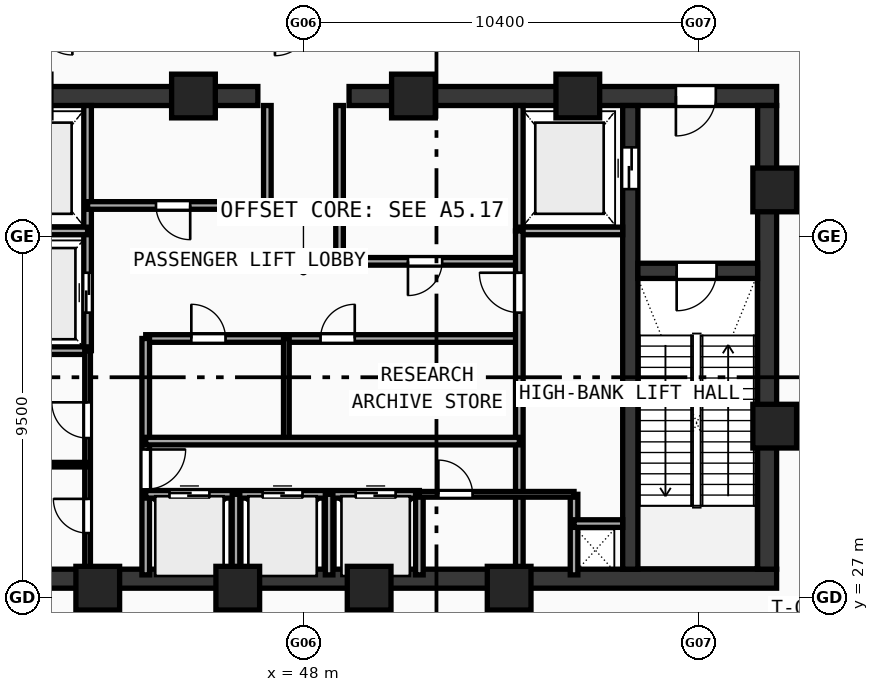
"""IFC4 building model, lengths in metres.
Left out: names, types, materials, properties, quantities, classifications, styles, units other than length and angle.
Written with IfcOpenShell. Run it as: python <this file> out.ifc"""

import sys

from ifc_helpers import new_model, si_unit, direction, frame, frame_2d, origin, origin_with_axes, origin_2d, place, context, subcontext, project, spatial, rectangle, hollow_rectangle, extrude, source, transform, mapped, element, fill, save


model = new_model("IFC4")
c1 = context("Model", 3, precision=1e-05, world=origin(), true_north=direction((0.0, 1.0)))
c2 = subcontext(c1, "Body", "Model", "MODEL_VIEW")
j1 = project(units=[si_unit("LENGTHUNIT", "METRE"), si_unit("PLANEANGLEUNIT", "RADIAN")], contexts=[c1])
p1 = place(None, origin())
s1 = spatial("IfcSite", under=j1, at=p1, CompositionType="ELEMENT")
p2 = place(p1, origin())
s2 = spatial("IfcBuilding", under=s1, at=p2, CompositionType="ELEMENT")
p3 = place(p2, frame((0.0, 0.0, 266.91)))
s3 = spatial("IfcBuildingStorey", under=s2, at=p3, CompositionType="ELEMENT", Elevation=266.91)
p4 = place(p3, frame((35.55, 27.5, 0.0), z_axis=(0.0, 0.0, 1.0), x_axis=(1.0, 0.0, 0.0)))
e1 = element("IfcWall", 1, at=p4, inside=s3, PredefinedType="SHEAR", context=c2, shape_type="SweptSolid", body=[
    extrude(rectangle(XDim=24.9, YDim=0.5, at=frame_2d((12.45, 0.0))), origin(), (0.0, 0.0, 1.0), 5.57),
])
p5 = place(p3, frame((35.55, 40.2, 0.0), z_axis=(0.0, 0.0, 1.0), x_axis=(1.0, 0.0, 0.0)))
e2 = element("IfcWall", 2, at=p5, inside=s3, PredefinedType="SHEAR", context=c2, shape_type="SweptSolid", body=[
    extrude(rectangle(XDim=11.25, YDim=0.5, at=frame_2d((5.625, 0.0))), origin(), (0.0, 0.0, 1.0), 5.57),
])
p6 = place(p5, frame((1.6, 0.0, 0.0)))
e3 = element("IfcOpeningElement", 3, at=p6, cuts=e2, PredefinedType="OPENING", context=c2, shape_type="SweptSolid", body=[
    extrude(rectangle(XDim=1.05, YDim=2.1, at=frame_2d((0.525, 1.05))), frame((0.0, 0.26, 0.0), z_axis=(0.0, -1.0, 0.0), x_axis=(1.0, 0.0, 0.0)), (0.0, 0.0, 1.0), 0.52),
])
p7 = place(p3, frame((49.2, 40.2, 0.0), z_axis=(0.0, 0.0, 1.0), x_axis=(1.0, 0.0, 0.0)))
e4 = element("IfcWall", 4, at=p7, inside=s3, PredefinedType="SHEAR", context=c2, shape_type="SweptSolid", body=[
    extrude(rectangle(XDim=11.25, YDim=0.5, at=frame_2d((5.625, 0.0))), origin(), (0.0, 0.0, 1.0), 5.57),
])
p8 = place(p7, frame((8.6, 0.0, 0.0)))
e5 = element("IfcOpeningElement", 5, at=p8, cuts=e4, PredefinedType="OPENING", context=c2, shape_type="SweptSolid", body=[
    extrude(rectangle(XDim=1.05, YDim=2.1, at=frame_2d((0.525, 1.05))), frame((0.0, 0.26, 0.0), z_axis=(0.0, -1.0, 0.0), x_axis=(1.0, 0.0, 0.0)), (0.0, 0.0, 1.0), 0.52),
])
p9 = place(p3, frame((60.2, 27.75, 0.0), z_axis=(0.0, 0.0, 1.0), x_axis=(0.0, 1.0, 0.0)))
e6 = element("IfcWall", 6, at=p9, inside=s3, PredefinedType="SHEAR", context=c2, shape_type="SweptSolid", body=[
    extrude(rectangle(XDim=12.2, YDim=0.5, at=frame_2d((6.1, 0.0))), origin(), (0.0, 0.0, 1.0), 5.57),
])
p10 = place(p3, frame((56.6, 27.75, 0.0), z_axis=(0.0, 0.0, 1.0), x_axis=(0.0, 1.0, 0.0)))
e7 = element("IfcWall", 7, at=p10, inside=s3, PredefinedType="SHEAR", context=c2, shape_type="SweptSolid", body=[
    extrude(rectangle(XDim=12.2, YDim=0.4, at=frame_2d((6.1, 0.0))), origin(), (0.0, 0.0, 1.0), 5.57),
])
p11 = place(p10, frame((10.0, 0.0, 0.0)))
e8 = element("IfcOpeningElement", 8, at=p11, cuts=e7, PredefinedType="OPENING", context=c2, shape_type="SweptSolid", body=[
    extrude(rectangle(XDim=1.1, YDim=2.1, at=frame_2d((0.55, 1.05))), frame((0.0, 0.21, 0.0), z_axis=(0.0, -1.0, 0.0), x_axis=(1.0, 0.0, 0.0)), (0.0, 0.0, 1.0), 0.42),
])
p12 = place(p3, frame((56.8, 35.6, 0.0), z_axis=(0.0, 0.0, 1.0), x_axis=(1.0, 0.0, 0.0)))
e9 = element("IfcWall", 9, at=p12, inside=s3, PredefinedType="SHEAR", context=c2, shape_type="SweptSolid", body=[
    extrude(rectangle(XDim=3.15, YDim=0.4, at=frame_2d((1.575, 0.0))), origin(), (0.0, 0.0, 1.0), 5.57),
])
p13 = place(p12, frame((1.02, 0.0, 0.0)))
e10 = element("IfcOpeningElement", 10, at=p13, cuts=e9, PredefinedType="OPENING", context=c2, shape_type="SweptSolid", body=[
    extrude(rectangle(XDim=1.05, YDim=2.1, at=frame_2d((0.525, 1.05))), frame((0.0, 0.21, 0.0), z_axis=(0.0, -1.0, 0.0), x_axis=(1.0, 0.0, 0.0)), (0.0, 0.0, 1.0), 0.42),
])
m1 = source(origin(), c2, "Body", "SweptSolid", [
    extrude(hollow_rectangle(XDim=1.15, YDim=1.15, WallThickness=0.048, at=origin_2d()), origin(), (0.0, 0.0, 1.0), 5.83),
])
for number, where, z_axis, x_axis in (
    (11, (42.588, 27.25, -0.26), (0.0, 0.0, 1.0), (1.0, 0.0, 0.0)),
    (12, (46.272, 27.25, -0.26), (0.0, 0.0, 1.0), (1.0, 0.0, 0.0)),
    (13, (49.729, 27.25, -0.26), (0.0, 0.0, 1.0), (1.0, 0.0, 0.0)),
    (14, (53.412, 27.25, -0.26), (0.0, 0.0, 1.0), (1.0, 0.0, 0.0)),
    (15, (60.4, 31.513, -0.26), (0.0, 0.0, 1.0), (1.0, 0.0, 0.0)),
    (16, (60.4, 37.729, -0.26), (0.0, 0.0, 1.0), (1.0, 0.0, 0.0)),
    (17, (55.219, 40.2, -0.26), (0.0, 0.0, 1.0), (1.0, 0.0, 0.0)),
    (18, (50.894, 40.2, -0.26), (0.0, 0.0, 1.0), (1.0, 0.0, 0.0)),
    (19, (45.106, 40.2, -0.26), (0.0, 0.0, 1.0), (1.0, 0.0, 0.0)),
):
    element("IfcColumn", number, at=place(p3, frame(where, z_axis=z_axis, x_axis=x_axis)), inside=s3, PredefinedType="COLUMN", context=c2, shape_type="MappedRepresentation", body=[
        mapped(m1, transform((0.0, 0.0, 0.0), scale=1.0)),
    ])
p14 = place(p3, frame((42.32, 33.5, 0.0), z_axis=(0.0, 0.0, 1.0), x_axis=(0.0, 1.0, 0.0)))
e20 = element("IfcWall", 20, at=p14, inside=s3, PredefinedType="SOLIDWALL", context=c2, shape_type="SweptSolid", body=[
    extrude(rectangle(XDim=6.45, YDim=0.2, at=frame_2d((3.225, 0.0))), origin(), (0.0, 0.0, 1.0), 5.57),
])
p15 = place(p14, frame((1.0, 0.0, 0.0)))
e21 = element("IfcOpeningElement", 21, at=p15, cuts=e20, PredefinedType="OPENING", context=c2, shape_type="SweptSolid", body=[
    extrude(rectangle(XDim=1.05, YDim=2.1, at=frame_2d((0.525, 1.05))), frame((0.0, 0.11, 0.0), z_axis=(0.0, -1.0, 0.0), x_axis=(1.0, 0.0, 0.0)), (0.0, 0.0, 1.0), 0.22),
])
for number, where, z_axis, x_axis in (
    (22, (39.6, 36.65, 0.0), (0.0, 0.0, 1.0), (1.0, 0.0, 0.0)),
    (23, (39.6, 33.5, 0.0), (0.0, 0.0, 1.0), (1.0, 0.0, 0.0)),
):
    element("IfcWall", number, at=place(p3, frame(where, z_axis=z_axis, x_axis=x_axis)), inside=s3, PredefinedType="SOLIDWALL", context=c2, shape_type="SweptSolid", body=[
        extrude(rectangle(XDim=2.72, YDim=0.2, at=frame_2d((1.36, 0.0))), origin(), (0.0, 0.0, 1.0), 5.57),
    ])
p16 = place(p3, frame((53.68, 36.65, 0.0), z_axis=(0.0, 0.0, 1.0), x_axis=(0.0, 1.0, 0.0)))
e24 = element("IfcWall", 24, at=p16, inside=s3, PredefinedType="SOLIDWALL", context=c2, shape_type="SweptSolid", body=[
    extrude(rectangle(XDim=3.3, YDim=0.2, at=frame_2d((1.65, 0.0))), origin(), (0.0, 0.0, 1.0), 5.57),
])
p17 = place(p3, frame((53.68, 36.65, 0.0), z_axis=(0.0, 0.0, 1.0), x_axis=(1.0, 0.0, 0.0)))
e25 = element("IfcWall", 25, at=p17, inside=s3, PredefinedType="SOLIDWALL", context=c2, shape_type="SweptSolid", body=[
    extrude(rectangle(XDim=2.72, YDim=0.2, at=frame_2d((1.36, 0.0))), origin(), (0.0, 0.0, 1.0), 5.57),
])
p18 = place(p3, frame((42.32, 37.32, 0.0), z_axis=(0.0, 0.0, 1.0), x_axis=(1.0, 0.0, 0.0)))
e26 = element("IfcWall", 26, at=p18, inside=s3, PredefinedType="SOLIDWALL", context=c2, shape_type="SweptSolid", body=[
    extrude(rectangle(XDim=4.73, YDim=0.2, at=frame_2d((2.365, 0.0))), origin(), (0.0, 0.0, 1.0), 5.57),
])
p19 = place(p18, frame((1.8, 0.0, 0.0)))
e27 = element("IfcOpeningElement", 27, at=p19, cuts=e26, PredefinedType="OPENING", context=c2, shape_type="SweptSolid", body=[
    extrude(rectangle(XDim=0.9, YDim=2.1, at=frame_2d((0.45, 1.05))), frame((0.0, 0.11, 0.0), z_axis=(0.0, -1.0, 0.0), x_axis=(1.0, 0.0, 0.0)), (0.0, 0.0, 1.0), 0.22),
])
p20 = place(p3, frame((48.95, 35.85, 0.0), z_axis=(0.0, 0.0, 1.0), x_axis=(1.0, 0.0, 0.0)))
e28 = element("IfcWall", 28, at=p20, inside=s3, PredefinedType="SOLIDWALL", context=c2, shape_type="SweptSolid", body=[
    extrude(rectangle(XDim=4.73, YDim=0.2, at=frame_2d((2.365, 0.0))), origin(), (0.0, 0.0, 1.0), 5.57),
])
p21 = place(p20, frame((1.8, 0.0, 0.0)))
e29 = element("IfcOpeningElement", 29, at=p21, cuts=e28, PredefinedType="OPENING", context=c2, shape_type="SweptSolid", body=[
    extrude(rectangle(XDim=0.9, YDim=2.1, at=frame_2d((0.45, 1.05))), frame((0.0, 0.11, 0.0), z_axis=(0.0, -1.0, 0.0), x_axis=(1.0, 0.0, 0.0)), (0.0, 0.0, 1.0), 0.22),
])
p22 = place(p3, frame((47.05, 37.32, 0.0), z_axis=(0.0, 0.0, 1.0), x_axis=(0.0, 1.0, 0.0)))
e30 = element("IfcWall", 30, at=p22, inside=s3, PredefinedType="SOLIDWALL", context=c2, shape_type="SweptSolid", body=[
    extrude(rectangle(XDim=2.63, YDim=0.2, at=frame_2d((1.315, 0.0))), origin(), (0.0, 0.0, 1.0), 5.57),
])
p23 = place(p3, frame((48.95, 35.85, 0.0), z_axis=(0.0, 0.0, 1.0), x_axis=(0.0, 1.0, 0.0)))
e31 = element("IfcWall", 31, at=p23, inside=s3, PredefinedType="SOLIDWALL", context=c2, shape_type="SweptSolid", body=[
    extrude(rectangle(XDim=4.1, YDim=0.2, at=frame_2d((2.05, 0.0))), origin(), (0.0, 0.0, 1.0), 5.57),
])
p24 = place(p3, frame((43.85, 33.82, 0.0), z_axis=(0.0, 0.0, 1.0), x_axis=(1.0, 0.0, 0.0)))
e32 = element("IfcWall", 32, at=p24, inside=s3, PredefinedType="SOLIDWALL", context=c2, shape_type="SweptSolid", body=[
    extrude(rectangle(XDim=9.83, YDim=0.2, at=frame_2d((4.915, 0.0))), origin(), (0.0, 0.0, 1.0), 5.57),
])
p25 = place(p24, frame((1.2, 0.0, 0.0)))
e33 = element("IfcOpeningElement", 33, at=p25, cuts=e32, PredefinedType="OPENING", context=c2, shape_type="SweptSolid", body=[
    extrude(rectangle(XDim=0.9, YDim=2.1, at=frame_2d((0.45, 1.05))), frame((0.0, 0.11, 0.0), z_axis=(0.0, -1.0, 0.0), x_axis=(1.0, 0.0, 0.0)), (0.0, 0.0, 1.0), 0.22),
])
p26 = place(p24, frame((4.6, 0.0, 0.0)))
e34 = element("IfcOpeningElement", 34, at=p26, cuts=e32, PredefinedType="OPENING", context=c2, shape_type="SweptSolid", body=[
    extrude(rectangle(XDim=0.9, YDim=2.1, at=frame_2d((0.45, 1.05))), frame((0.0, 0.11, 0.0), z_axis=(0.0, -1.0, 0.0), x_axis=(1.0, 0.0, 0.0)), (0.0, 0.0, 1.0), 0.22),
])
p27 = place(p3, frame((43.85, 27.6, 0.0), z_axis=(0.0, 0.0, 1.0), x_axis=(0.0, 1.0, 0.0)))
e35 = element("IfcWall", 35, at=p27, inside=s3, PredefinedType="SOLIDWALL", context=c2, shape_type="SweptSolid", body=[
    extrude(rectangle(XDim=6.22, YDim=0.2, at=frame_2d((3.11, 0.0))), origin(), (0.0, 0.0, 1.0), 5.57),
])
p28 = place(p27, frame((2.25, 0.0, 0.0)))
e36 = element("IfcOpeningElement", 36, at=p28, cuts=e35, PredefinedType="OPENING", context=c2, shape_type="SweptSolid", body=[
    extrude(rectangle(XDim=1.05, YDim=2.1, at=frame_2d((0.525, 1.05))), frame((0.0, 0.11, 0.0), z_axis=(0.0, -1.0, 0.0), x_axis=(1.0, 0.0, 0.0)), (0.0, 0.0, 1.0), 0.22),
])
p29 = place(p3, frame((53.68, 27.6, 0.0), z_axis=(0.0, 0.0, 1.0), x_axis=(0.0, 1.0, 0.0)))
e37 = element("IfcWall", 37, at=p29, inside=s3, PredefinedType="SOLIDWALL", context=c2, shape_type="SweptSolid", body=[
    extrude(rectangle(XDim=9.05, YDim=0.2, at=frame_2d((4.525, 0.0))), origin(), (0.0, 0.0, 1.0), 2.22),
])
p30 = place(p29, frame((6.9, 0.0, 0.0)))
e38 = element("IfcOpeningElement", 38, at=p30, cuts=e37, PredefinedType="OPENING", context=c2, shape_type="SweptSolid", body=[
    extrude(rectangle(XDim=1.05, YDim=2.1, at=frame_2d((0.525, 1.05))), frame((0.0, 0.11, 0.0), z_axis=(0.0, -1.0, 0.0), x_axis=(1.0, 0.0, 0.0)), (0.0, 0.0, 1.0), 0.22),
])
p31 = place(p3, frame((47.55, 31.12, 0.0), z_axis=(0.0, 0.0, 1.0), x_axis=(0.0, 1.0, 0.0)))
e39 = element("IfcWall", 39, at=p31, inside=s3, PredefinedType="PARTITIONING", context=c2, shape_type="SweptSolid", body=[
    extrude(rectangle(XDim=2.7, YDim=0.15, at=frame_2d((1.35, 0.0))), origin(), (0.0, 0.0, 1.0), 5.57),
])
p32 = place(p3, frame((43.85, 29.72, 0.0), z_axis=(0.0, 0.0, 1.0), x_axis=(1.0, 0.0, 0.0)))
e40 = element("IfcWall", 40, at=p32, inside=s3, PredefinedType="SOLIDWALL", context=c2, shape_type="SweptSolid", body=[
    extrude(rectangle(XDim=7.2, YDim=0.2, at=frame_2d((3.6, 0.0))), origin(), (0.0, 0.0, 1.0), 5.57),
])
p33 = place(p32, frame((0.625, 0.0, 0.0)))
e41 = element("IfcOpeningElement", 41, at=p33, cuts=e40, PredefinedType="OPENING", context=c2, shape_type="SweptSolid", body=[
    extrude(rectangle(XDim=1.05, YDim=2.1, at=frame_2d((0.525, 1.05))), frame((0.0, 0.11, 0.0), z_axis=(0.0, -1.0, 0.0), x_axis=(1.0, 0.0, 0.0)), (0.0, 0.0, 1.0), 0.22),
])
p34 = place(p32, frame((3.075, 0.0, 0.0)))
e42 = element("IfcOpeningElement", 42, at=p34, cuts=e40, PredefinedType="OPENING", context=c2, shape_type="SweptSolid", body=[
    extrude(rectangle(XDim=1.05, YDim=2.1, at=frame_2d((0.525, 1.05))), frame((0.0, 0.11, 0.0), z_axis=(0.0, -1.0, 0.0), x_axis=(1.0, 0.0, 0.0)), (0.0, 0.0, 1.0), 0.22),
])
p35 = place(p32, frame((5.525, 0.0, 0.0)))
e43 = element("IfcOpeningElement", 43, at=p35, cuts=e40, PredefinedType="OPENING", context=c2, shape_type="SweptSolid", body=[
    extrude(rectangle(XDim=1.05, YDim=2.1, at=frame_2d((0.525, 1.05))), frame((0.0, 0.11, 0.0), z_axis=(0.0, -1.0, 0.0), x_axis=(1.0, 0.0, 0.0)), (0.0, 0.0, 1.0), 0.22),
])
p36 = place(p3, frame((51.05, 27.6, 0.0), z_axis=(0.0, 0.0, 1.0), x_axis=(0.0, 1.0, 0.0)))
e44 = element("IfcWall", 44, at=p36, inside=s3, PredefinedType="SOLIDWALL", context=c2, shape_type="SweptSolid", body=[
    extrude(rectangle(XDim=2.12, YDim=0.2, at=frame_2d((1.06, 0.0))), origin(), (0.0, 0.0, 1.0), 5.57),
])
p37 = place(p3, frame((43.85, 31.12, 0.0), z_axis=(0.0, 0.0, 1.0), x_axis=(1.0, 0.0, 0.0)))
e45 = element("IfcWall", 45, at=p37, inside=s3, PredefinedType="SOLIDWALL", context=c2, shape_type="SweptSolid", body=[
    extrude(rectangle(XDim=9.83, YDim=0.2, at=frame_2d((4.915, 0.0))), origin(), (0.0, 0.0, 1.0), 5.57),
])
p38 = place(p3, frame((46.225, 27.6, 0.0), z_axis=(0.0, 0.0, 1.0), x_axis=(0.0, 1.0, 0.0)))
e46 = element("IfcWall", 46, at=p38, inside=s3, PredefinedType="SOLIDWALL", context=c2, shape_type="SweptSolid", body=[
    extrude(rectangle(XDim=2.12, YDim=0.2, at=frame_2d((1.06, 0.0))), origin(), (0.0, 0.0, 1.0), 2.22),
])
for number, where, z_axis, x_axis in (
    (47, (48.675, 27.6, 0.0), (0.0, 0.0, 1.0), (0.0, 1.0, 0.0)),
    (48, (55.12, 27.6, 0.0), (0.0, 0.0, 1.0), (0.0, 1.0, 0.0)),
):
    element("IfcWall", number, at=place(p3, frame(where, z_axis=z_axis, x_axis=x_axis)), inside=s3, PredefinedType="SOLIDWALL", context=c2, shape_type="SweptSolid", body=[
        extrude(rectangle(XDim=2.12, YDim=0.2, at=frame_2d((1.06, 0.0))), origin(), (0.0, 0.0, 1.0), 5.57),
    ])
p39 = place(p3, frame((55.12, 28.95, 0.0), z_axis=(0.0, 0.0, 1.0), x_axis=(1.0, 0.0, 0.0)))
e49 = element("IfcWall", 49, at=p39, inside=s3, PredefinedType="SOLIDWALL", context=c2, shape_type="SweptSolid", body=[
    extrude(rectangle(XDim=1.28, YDim=0.2, at=frame_2d((0.64, 0.0))), origin(), (0.0, 0.0, 1.0), 5.57),
])
p40 = place(p3, frame((42.32, 27.6, 0.0), z_axis=(0.0, 0.0, 1.0), x_axis=(0.0, 1.0, 0.0)))
e50 = element("IfcWall", 50, at=p40, inside=s3, PredefinedType="PARTITIONING", context=c2, shape_type="SweptSolid", body=[
    extrude(rectangle(XDim=5.9, YDim=0.15, at=frame_2d((2.95, 0.0))), origin(), (0.0, 0.0, 1.0), 2.22),
])
p41 = place(p40, frame((1.1, 0.0, 0.0)))
e51 = element("IfcOpeningElement", 51, at=p41, cuts=e50, PredefinedType="OPENING", context=c2, shape_type="SweptSolid", body=[
    extrude(rectangle(XDim=0.9, YDim=2.1, at=frame_2d((0.45, 1.05))), frame((0.0, 0.085, 0.0), z_axis=(0.0, -1.0, 0.0), x_axis=(1.0, 0.0, 0.0)), (0.0, 0.0, 1.0), 0.17),
])
p42 = place(p40, frame((3.6, 0.0, 0.0)))
e52 = element("IfcOpeningElement", 52, at=p42, cuts=e50, PredefinedType="OPENING", context=c2, shape_type="SweptSolid", body=[
    extrude(rectangle(XDim=0.94, YDim=2.1, at=frame_2d((0.47, 1.05))), frame((0.0, 0.085, 0.0), z_axis=(0.0, -1.0, 0.0), x_axis=(1.0, 0.0, 0.0)), (0.0, 0.0, 1.0), 0.17),
])
p43 = place(p3, frame((51.05, 29.72, 0.0), z_axis=(0.0, 0.0, 1.0), x_axis=(1.0, 0.0, 0.0)))
e53 = element("IfcWall", 53, at=p43, inside=s3, PredefinedType="PARTITIONING", context=c2, shape_type="SweptSolid", body=[
    extrude(rectangle(XDim=4.07, YDim=0.15, at=frame_2d((2.035, 0.0))), origin(), (0.0, 0.0, 1.0), 5.57),
])
p44 = place(p43, frame((0.5, 0.0, 0.0)))
e54 = element("IfcOpeningElement", 54, at=p44, cuts=e53, PredefinedType="OPENING", context=c2, shape_type="SweptSolid", body=[
    extrude(rectangle(XDim=0.9, YDim=2.1, at=frame_2d((0.45, 1.05))), frame((0.0, 0.085, 0.0), z_axis=(0.0, -1.0, 0.0), x_axis=(1.0, 0.0, 0.0)), (0.0, 0.0, 1.0), 0.17),
])
p45 = place(p3, frame((39.6, 30.5, 0.0), z_axis=(0.0, 0.0, 1.0), x_axis=(1.0, 0.0, 0.0)))
e55 = element("IfcWall", 55, at=p45, inside=s3, PredefinedType="PARTITIONING", context=c2, shape_type="SweptSolid", body=[
    extrude(rectangle(XDim=2.72, YDim=0.12, at=frame_2d((1.36, 0.0))), origin(), (0.0, 0.0, 1.0), 5.57),
])
m2 = source(origin(), c2, "Body", "SweptSolid", [
    extrude(rectangle(XDim=1.05, YDim=2.1, at=frame_2d((0.525, 1.05))), frame((0.0, 0.025, 0.0), z_axis=(0.0, -1.0, 0.0), x_axis=(1.0, 0.0, 0.0)), (0.0, 0.0, 1.0), 0.05),
])
p46 = place(p13, frame((1.05, 0.0, 0.0), z_axis=(0.0, 0.0, 1.0), x_axis=(-1.0, 0.0, 0.0)))
e56 = element("IfcDoor", 56, at=p46, inside=s3, OperationType="SINGLE_SWING_RIGHT", PredefinedType="DOOR", context=c2, shape_type="MappedRepresentation", body=[
    mapped(m2, transform((0.0, 0.0, 0.0), scale=1.0)),
])
fill(e10, e56)
p47 = place(p8, frame((1.05, 0.0, 0.0), z_axis=(0.0, 0.0, 1.0), x_axis=(-1.0, 0.0, 0.0)))
e57 = element("IfcDoor", 57, at=p47, inside=s3, OperationType="SINGLE_SWING_RIGHT", PredefinedType="DOOR", context=c2, shape_type="MappedRepresentation", body=[
    mapped(m2, transform((0.0, 0.0, 0.0), scale=1.0)),
])
fill(e5, e57)
m3 = source(origin(), c2, "Body", "SweptSolid", [
    extrude(rectangle(XDim=1.1, YDim=2.1, at=frame_2d((0.55, 1.05))), frame((0.0, 0.025, 0.0), z_axis=(0.0, -1.0, 0.0), x_axis=(1.0, 0.0, 0.0)), (0.0, 0.0, 1.0), 0.05),
])
p48 = place(p11, origin_with_axes())
e58 = element("IfcDoor", 58, at=p48, inside=s3, OperationType="DOUBLE_DOOR_SLIDING", PredefinedType="DOOR", context=c2, shape_type="MappedRepresentation", body=[
    mapped(m3, transform((0.0, 0.0, 0.0), scale=1.0)),
])
fill(e8, e58)
p49 = place(p15, origin_with_axes())
e59 = element("IfcDoor", 59, at=p49, inside=s3, OperationType="DOUBLE_DOOR_SLIDING", PredefinedType="DOOR", context=c2, shape_type="MappedRepresentation", body=[
    mapped(m2, transform((0.0, 0.0, 0.0), scale=1.0)),
])
fill(e21, e59)
m4 = source(origin(), c2, "Body", "SweptSolid", [
    extrude(rectangle(XDim=0.9, YDim=2.1, at=frame_2d((0.45, 1.05))), frame((0.0, 0.025, 0.0), z_axis=(0.0, -1.0, 0.0), x_axis=(1.0, 0.0, 0.0)), (0.0, 0.0, 1.0), 0.05),
])
p50 = place(p19, frame((0.9, 0.0, 0.0), z_axis=(0.0, 0.0, 1.0), x_axis=(-1.0, 0.0, 0.0)))
e60 = element("IfcDoor", 60, at=p50, inside=s3, OperationType="SINGLE_SWING_LEFT", PredefinedType="DOOR", context=c2, shape_type="MappedRepresentation", body=[
    mapped(m4, transform((0.0, 0.0, 0.0), scale=1.0)),
])
fill(e27, e60)
p51 = place(p21, frame((0.9, 0.0, 0.0), z_axis=(0.0, 0.0, 1.0), x_axis=(-1.0, 0.0, 0.0)))
e61 = element("IfcDoor", 61, at=p51, inside=s3, OperationType="SINGLE_SWING_RIGHT", PredefinedType="DOOR", context=c2, shape_type="MappedRepresentation", body=[
    mapped(m4, transform((0.0, 0.0, 0.0), scale=1.0)),
])
fill(e29, e61)
p52 = place(p25, origin_with_axes())
e62 = element("IfcDoor", 62, at=p52, inside=s3, OperationType="SINGLE_SWING_LEFT", PredefinedType="DOOR", context=c2, shape_type="MappedRepresentation", body=[
    mapped(m4, transform((0.0, 0.0, 0.0), scale=1.0)),
])
fill(e33, e62)
p53 = place(p26, origin_with_axes())
e63 = element("IfcDoor", 63, at=p53, inside=s3, OperationType="SINGLE_SWING_RIGHT", PredefinedType="DOOR", context=c2, shape_type="MappedRepresentation", body=[
    mapped(m4, transform((0.0, 0.0, 0.0), scale=1.0)),
])
fill(e34, e63)
p54 = place(p28, frame((1.05, 0.0, 0.0), z_axis=(0.0, 0.0, 1.0), x_axis=(-1.0, 0.0, 0.0)))
e64 = element("IfcDoor", 64, at=p54, inside=s3, OperationType="SINGLE_SWING_LEFT", PredefinedType="DOOR", context=c2, shape_type="MappedRepresentation", body=[
    mapped(m2, transform((0.0, 0.0, 0.0), scale=1.0)),
])
fill(e36, e64)
p55 = place(p30, origin_with_axes())
e65 = element("IfcDoor", 65, at=p55, inside=s3, OperationType="SINGLE_SWING_RIGHT", PredefinedType="DOOR", context=c2, shape_type="MappedRepresentation", body=[
    mapped(m2, transform((0.0, 0.0, 0.0), scale=1.0)),
])
fill(e38, e65)
p56 = place(p33, origin_with_axes())
e66 = element("IfcDoor", 66, at=p56, inside=s3, OperationType="DOUBLE_DOOR_SLIDING", PredefinedType="DOOR", context=c2, shape_type="MappedRepresentation", body=[
    mapped(m2, transform((0.0, 0.0, 0.0), scale=1.0)),
])
fill(e41, e66)
p57 = place(p34, origin_with_axes())
e67 = element("IfcDoor", 67, at=p57, inside=s3, OperationType="DOUBLE_DOOR_SLIDING", PredefinedType="DOOR", context=c2, shape_type="MappedRepresentation", body=[
    mapped(m2, transform((0.0, 0.0, 0.0), scale=1.0)),
])
fill(e42, e67)
p58 = place(p35, origin_with_axes())
e68 = element("IfcDoor", 68, at=p58, inside=s3, OperationType="DOUBLE_DOOR_SLIDING", PredefinedType="DOOR", context=c2, shape_type="MappedRepresentation", body=[
    mapped(m2, transform((0.0, 0.0, 0.0), scale=1.0)),
])
fill(e43, e68)
p59 = place(p41, origin_with_axes())
e69 = element("IfcDoor", 69, at=p59, inside=s3, OperationType="SINGLE_SWING_RIGHT", PredefinedType="DOOR", context=c2, shape_type="MappedRepresentation", body=[
    mapped(m4, transform((0.0, 0.0, 0.0), scale=1.0)),
])
fill(e51, e69)
m5 = source(origin(), c2, "Body", "SweptSolid", [
    extrude(rectangle(XDim=0.94, YDim=2.1, at=frame_2d((0.47, 1.05))), frame((0.0, 0.025, 0.0), z_axis=(0.0, -1.0, 0.0), x_axis=(1.0, 0.0, 0.0)), (0.0, 0.0, 1.0), 0.05),
])
p60 = place(p42, origin_with_axes())
e70 = element("IfcDoor", 70, at=p60, inside=s3, OperationType="SINGLE_SWING_RIGHT", PredefinedType="DOOR", context=c2, shape_type="MappedRepresentation", body=[
    mapped(m5, transform((0.0, 0.0, 0.0), scale=1.0)),
])
fill(e52, e70)
p61 = place(p44, origin_with_axes())
e71 = element("IfcDoor", 71, at=p61, inside=s3, OperationType="SINGLE_SWING_LEFT", PredefinedType="DOOR", context=c2, shape_type="MappedRepresentation", body=[
    mapped(m4, transform((0.0, 0.0, 0.0), scale=1.0)),
])
fill(e54, e71)
save(model, sys.argv[1])
